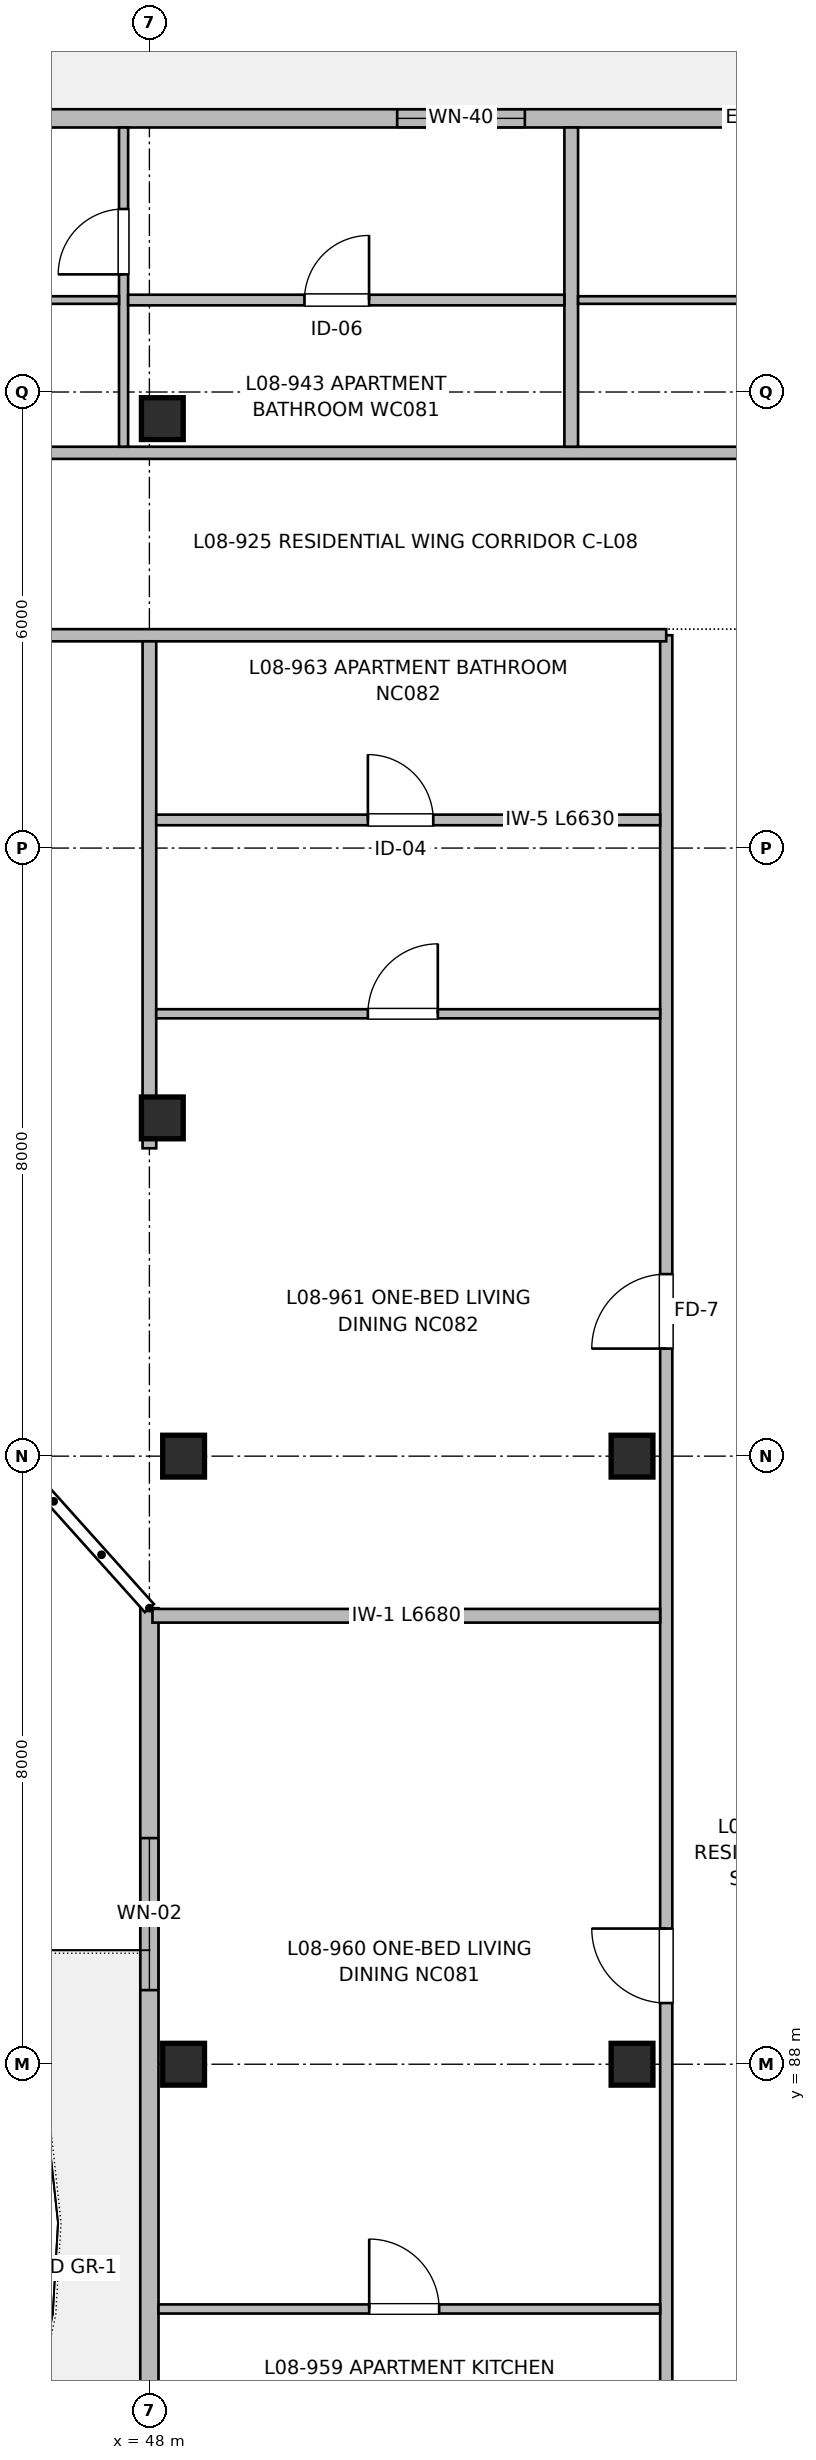
"""IFC4 building model, lengths in metres.
Left out: names, types, materials, properties, quantities, classifications, styles, units other than length and angle.
Written with IfcOpenShell. Run it as: python <this file> out.ifc"""

import sys

from ifc_helpers import new_model, si_unit, direction, frame, frame_2d, origin, origin_2d, place, context, subcontext, project, spatial, rectangle, extrude, element, fill, save


model = new_model("IFC4")
c1 = context("Model", 3, precision=1e-05, world=origin(), true_north=direction((0.0, 1.0)))
c2 = subcontext(c1, "Body", "Model", "MODEL_VIEW")
j1 = project(units=[si_unit("LENGTHUNIT", "METRE"), si_unit("PLANEANGLEUNIT", "RADIAN")], contexts=[c1])
p1 = place(None, origin())
s1 = spatial("IfcSite", under=j1, at=p1, CompositionType="ELEMENT")
p2 = place(p1, origin())
s2 = spatial("IfcBuilding", under=s1, at=p2, CompositionType="ELEMENT")
p3 = place(p2, frame((0.0, 0.0, 26.56)))
s3 = spatial("IfcBuildingStorey", under=s2, at=p3, CompositionType="ELEMENT", Elevation=26.56)
for number, where, z_axis, x_axis in (
    (1, (48.17, 100.45, 0.0), (0.0, 0.0, 1.0), (1.0, 0.0, 0.0)),
    (2, (48.17, 109.65, 0.0), (0.0, 0.0, 1.0), (1.0, 0.0, 0.0)),
    (3, (48.45, 88.0, 0.0), (0.0, 0.0, 1.0), (1.0, 0.0, 0.0)),
    (4, (48.45, 96.0, 0.0), (0.0, 0.0, 1.0), (1.0, 0.0, 0.0)),
    (5, (54.35, 88.0, 0.0), (0.0, 0.0, 1.0), (1.0, 0.0, 0.0)),
    (6, (54.35, 96.0, 0.0), (0.0, 0.0, 1.0), (1.0, 0.0, 0.0)),
):
    element("IfcColumn", number, at=place(p3, frame(where, z_axis=z_axis, x_axis=x_axis)), inside=s3, PredefinedType="COLUMN", context=c2, shape_type="SweptSolid", body=[
        extrude(rectangle(XDim=0.55, YDim=0.55, at=origin_2d()), origin(), (0.0, 0.0, 1.0), 3.2),
    ])
p4 = place(p3, frame((39.5, 113.6, 0.0), z_axis=(0.0, 0.0, 1.0), x_axis=(1.0, 0.0, 0.0)))
e7 = element("IfcWall", 7, at=p4, inside=s3, PredefinedType="SOLIDWALL", context=c2, shape_type="SweptSolid", body=[
    extrude(rectangle(XDim=42.0, YDim=0.24, at=frame_2d((21.0, 0.0))), origin(), (0.0, 0.0, 1.0), 2.98),
])
p5 = place(p4, frame((3.6, 0.0, 0.0)))
e8 = element("IfcOpeningElement", 8, at=p5, cuts=e7, PredefinedType="OPENING", context=c2, shape_type="SweptSolid", body=[
    extrude(rectangle(XDim=1.2, YDim=2.2, at=frame_2d((0.6, 1.1))), frame((0.0, 0.13, 0.0), z_axis=(0.0, -1.0, 0.0), x_axis=(1.0, 0.0, 0.0)), (0.0, 0.0, 1.0), 0.26),
])
p6 = place(p4, frame((5.5, 0.0, 0.87)))
e9 = element("IfcOpeningElement", 9, at=p6, cuts=e7, PredefinedType="OPENING", context=c2, shape_type="SweptSolid", body=[
    extrude(rectangle(XDim=1.25, YDim=1.35, at=frame_2d((0.625, 0.675))), frame((0.0, 0.13, 0.0), z_axis=(0.0, -1.0, 0.0), x_axis=(1.0, 0.0, 0.0)), (0.0, 0.0, 1.0), 0.26),
])
p7 = place(p4, frame((11.76, 0.0, 0.72)))
e10 = element("IfcOpeningElement", 10, at=p7, cuts=e7, PredefinedType="OPENING", context=c2, shape_type="SweptSolid", body=[
    extrude(rectangle(XDim=1.68, YDim=1.5, at=frame_2d((0.84, 0.75))), frame((0.0, 0.13, 0.0), z_axis=(0.0, -1.0, 0.0), x_axis=(1.0, 0.0, 0.0)), (0.0, 0.0, 1.0), 0.26),
])
p8 = place(p4, frame((20.4, 0.0, 0.0)))
e11 = element("IfcOpeningElement", 11, at=p8, cuts=e7, PredefinedType="OPENING", context=c2, shape_type="SweptSolid", body=[
    extrude(rectangle(XDim=1.2, YDim=2.2, at=frame_2d((0.6, 1.1))), frame((0.0, 0.13, 0.0), z_axis=(0.0, -1.0, 0.0), x_axis=(1.0, 0.0, 0.0)), (0.0, 0.0, 1.0), 0.26),
])
p9 = place(p4, frame((22.3, 0.0, 0.67)))
e12 = element("IfcOpeningElement", 12, at=p9, cuts=e7, PredefinedType="OPENING", context=c2, shape_type="SweptSolid", body=[
    extrude(rectangle(XDim=2.1, YDim=1.55, at=frame_2d((1.05, 0.775))), frame((0.0, 0.13, 0.0), z_axis=(0.0, -1.0, 0.0), x_axis=(1.0, 0.0, 0.0)), (0.0, 0.0, 1.0), 0.26),
])
p10 = place(p4, frame((28.4, 0.0, 0.72)))
e13 = element("IfcOpeningElement", 13, at=p10, cuts=e7, PredefinedType="OPENING", context=c2, shape_type="SweptSolid", body=[
    extrude(rectangle(XDim=2.0, YDim=1.5, at=frame_2d((1.0, 0.75))), frame((0.0, 0.13, 0.0), z_axis=(0.0, -1.0, 0.0), x_axis=(1.0, 0.0, 0.0)), (0.0, 0.0, 1.0), 0.26),
])
p11 = place(p4, frame((37.2, 0.0, 0.0)))
e14 = element("IfcOpeningElement", 14, at=p11, cuts=e7, PredefinedType="OPENING", context=c2, shape_type="SweptSolid", body=[
    extrude(rectangle(XDim=1.2, YDim=2.2, at=frame_2d((0.6, 1.1))), frame((0.0, 0.13, 0.0), z_axis=(0.0, -1.0, 0.0), x_axis=(1.0, 0.0, 0.0)), (0.0, 0.0, 1.0), 0.26),
])
p12 = place(p4, frame((39.1, 0.0, 0.9)))
e15 = element("IfcOpeningElement", 15, at=p12, cuts=e7, PredefinedType="OPENING", context=c2, shape_type="SweptSolid", body=[
    extrude(rectangle(XDim=1.05, YDim=1.15, at=frame_2d((0.525, 0.575))), frame((0.0, 0.13, 0.0), z_axis=(0.0, -1.0, 0.0), x_axis=(1.0, 0.0, 0.0)), (0.0, 0.0, 1.0), 0.26),
])
p13 = place(p3, frame((48.0, 61.8, 0.0), z_axis=(0.0, 0.0, 1.0), x_axis=(0.0, 1.0, 0.0)))
e16 = element("IfcWall", 16, at=p13, inside=s3, PredefinedType="SOLIDWALL", context=c2, shape_type="SweptSolid", body=[
    extrude(rectangle(XDim=32.2, YDim=0.24, at=frame_2d((16.1, 0.0))), origin(), (0.0, 0.0, 1.0), 2.98),
])
p14 = place(p13, frame((2.975, 0.0, 0.0)))
e17 = element("IfcOpeningElement", 17, at=p14, cuts=e16, PredefinedType="OPENING", context=c2, shape_type="SweptSolid", body=[
    extrude(rectangle(XDim=1.2, YDim=2.2, at=frame_2d((0.6, 1.1))), frame((0.0, 0.13, 0.0), z_axis=(0.0, -1.0, 0.0), x_axis=(1.0, 0.0, 0.0)), (0.0, 0.0, 1.0), 0.26),
])
p15 = place(p13, frame((5.775, 0.0, 0.87)))
e18 = element("IfcOpeningElement", 18, at=p15, cuts=e16, PredefinedType="OPENING", context=c2, shape_type="SweptSolid", body=[
    extrude(rectangle(XDim=1.25, YDim=1.35, at=frame_2d((0.625, 0.675))), frame((0.0, 0.13, 0.0), z_axis=(0.0, -1.0, 0.0), x_axis=(1.0, 0.0, 0.0)), (0.0, 0.0, 1.0), 0.26),
])
p16 = place(p13, frame((10.385, 0.0, 0.72)))
e19 = element("IfcOpeningElement", 19, at=p16, cuts=e16, PredefinedType="OPENING", context=c2, shape_type="SweptSolid", body=[
    extrude(rectangle(XDim=1.68, YDim=1.5, at=frame_2d((0.84, 0.75))), frame((0.0, 0.13, 0.0), z_axis=(0.0, -1.0, 0.0), x_axis=(1.0, 0.0, 0.0)), (0.0, 0.0, 1.0), 0.26),
])
p17 = place(p13, frame((18.375, 0.0, 0.72)))
e20 = element("IfcOpeningElement", 20, at=p17, cuts=e16, PredefinedType="OPENING", context=c2, shape_type="SweptSolid", body=[
    extrude(rectangle(XDim=1.8, YDim=1.5, at=frame_2d((0.9, 0.75))), frame((0.0, 0.13, 0.0), z_axis=(0.0, -1.0, 0.0), x_axis=(1.0, 0.0, 0.0)), (0.0, 0.0, 1.0), 0.26),
])
p18 = place(p13, frame((27.175, 0.0, 0.72)))
e21 = element("IfcOpeningElement", 21, at=p18, cuts=e16, PredefinedType="OPENING", context=c2, shape_type="SweptSolid", body=[
    extrude(rectangle(XDim=2.0, YDim=1.5, at=frame_2d((1.0, 0.75))), frame((0.0, 0.13, 0.0), z_axis=(0.0, -1.0, 0.0), x_axis=(1.0, 0.0, 0.0)), (0.0, 0.0, 1.0), 0.26),
])
p19 = place(p3, frame((54.8, 61.96, 0.0), z_axis=(0.0, 0.0, 1.0), x_axis=(0.0, 1.0, 0.0)))
e22 = element("IfcWall", 22, at=p19, inside=s3, PredefinedType="PARTITIONING", context=c2, shape_type="SweptSolid", body=[
    extrude(rectangle(XDim=44.84, YDim=0.16, at=frame_2d((22.42, 0.0))), origin(), (0.0, 0.0, 1.0), 2.935),
])
p20 = place(p19, frame((7.04, 0.0, 0.0)))
e23 = element("IfcOpeningElement", 23, at=p20, cuts=e22, PredefinedType="OPENING", context=c2, shape_type="SweptSolid", body=[
    extrude(rectangle(XDim=1.1, YDim=2.15, at=frame_2d((0.55, 1.075))), frame((0.0, 0.09, 0.0), z_axis=(0.0, -1.0, 0.0), x_axis=(1.0, 0.0, 0.0)), (0.0, 0.0, 1.0), 0.18),
])
p21 = place(p19, frame((13.44, 0.0, 0.0)))
e24 = element("IfcOpeningElement", 24, at=p21, cuts=e22, PredefinedType="OPENING", context=c2, shape_type="SweptSolid", body=[
    extrude(rectangle(XDim=1.6, YDim=2.15, at=frame_2d((0.8, 1.075))), frame((0.0, 0.09, 0.0), z_axis=(0.0, -1.0, 0.0), x_axis=(1.0, 0.0, 0.0)), (0.0, 0.0, 1.0), 0.18),
])
p22 = place(p19, frame((3.0, 0.0, 0.0)))
e25 = element("IfcOpeningElement", 25, at=p22, cuts=e22, PredefinedType="OPENING", context=c2, shape_type="SweptSolid", body=[
    extrude(rectangle(XDim=0.96, YDim=2.15, at=frame_2d((0.48, 1.075))), frame((0.0, 0.09, 0.0), z_axis=(0.0, -1.0, 0.0), x_axis=(1.0, 0.0, 0.0)), (0.0, 0.0, 1.0), 0.18),
])
p23 = place(p19, frame((26.845, 0.0, 0.0)))
e26 = element("IfcOpeningElement", 26, at=p23, cuts=e22, PredefinedType="OPENING", context=c2, shape_type="SweptSolid", body=[
    extrude(rectangle(XDim=0.98, YDim=2.15, at=frame_2d((0.49, 1.075))), frame((0.0, 0.09, 0.0), z_axis=(0.0, -1.0, 0.0), x_axis=(1.0, 0.0, 0.0)), (0.0, 0.0, 1.0), 0.18),
])
p24 = place(p19, frame((35.455, 0.0, 0.0)))
e27 = element("IfcOpeningElement", 27, at=p24, cuts=e22, PredefinedType="OPENING", context=c2, shape_type="SweptSolid", body=[
    extrude(rectangle(XDim=0.98, YDim=2.15, at=frame_2d((0.49, 1.075))), frame((0.0, 0.09, 0.0), z_axis=(0.0, -1.0, 0.0), x_axis=(1.0, 0.0, 0.0)), (0.0, 0.0, 1.0), 0.18),
])
p25 = place(p3, frame((39.66, 106.8, 0.0), z_axis=(0.0, 0.0, 1.0), x_axis=(1.0, 0.0, 0.0)))
e28 = element("IfcWall", 28, at=p25, inside=s3, PredefinedType="PARTITIONING", context=c2, shape_type="SweptSolid", body=[
    extrude(rectangle(XDim=15.14, YDim=0.16, at=frame_2d((7.57, 0.0))), origin(), (0.0, 0.0, 1.0), 2.935),
])
p26 = place(p3, frame((39.66, 109.2, 0.0), z_axis=(0.0, 0.0, 1.0), x_axis=(1.0, 0.0, 0.0)))
e29 = element("IfcWall", 29, at=p26, inside=s3, PredefinedType="PARTITIONING", context=c2, shape_type="SweptSolid", body=[
    extrude(rectangle(XDim=41.68, YDim=0.16, at=frame_2d((20.84, 0.0))), origin(), (0.0, 0.0, 1.0), 2.935),
])
p27 = place(p26, frame((3.51, 0.0, 0.0)))
e30 = element("IfcOpeningElement", 30, at=p27, cuts=e29, PredefinedType="OPENING", context=c2, shape_type="SweptSolid", body=[
    extrude(rectangle(XDim=0.98, YDim=2.15, at=frame_2d((0.49, 1.075))), frame((0.0, 0.09, 0.0), z_axis=(0.0, -1.0, 0.0), x_axis=(1.0, 0.0, 0.0)), (0.0, 0.0, 1.0), 0.18),
])
p28 = place(p26, frame((17.47, 0.0, 0.0)))
e31 = element("IfcOpeningElement", 31, at=p28, cuts=e29, PredefinedType="OPENING", context=c2, shape_type="SweptSolid", body=[
    extrude(rectangle(XDim=0.98, YDim=2.15, at=frame_2d((0.49, 1.075))), frame((0.0, 0.09, 0.0), z_axis=(0.0, -1.0, 0.0), x_axis=(1.0, 0.0, 0.0)), (0.0, 0.0, 1.0), 0.18),
])
p29 = place(p26, frame((31.39, 0.0, 0.0)))
e32 = element("IfcOpeningElement", 32, at=p29, cuts=e29, PredefinedType="OPENING", context=c2, shape_type="SweptSolid", body=[
    extrude(rectangle(XDim=0.98, YDim=2.15, at=frame_2d((0.49, 1.075))), frame((0.0, 0.09, 0.0), z_axis=(0.0, -1.0, 0.0), x_axis=(1.0, 0.0, 0.0)), (0.0, 0.0, 1.0), 0.18),
])
p30 = place(p3, frame((48.0, 100.05, 0.0), z_axis=(0.0, 0.0, 1.0), x_axis=(0.0, 1.0, 0.0)))
e33 = element("IfcWall", 33, at=p30, inside=s3, PredefinedType="PARTITIONING", context=c2, shape_type="SweptSolid", body=[
    extrude(rectangle(XDim=6.67, YDim=0.18, at=frame_2d((3.335, 0.0))), origin(), (0.0, 0.0, 1.0), 2.68),
])
p31 = place(p3, frame((53.55, 109.28, 0.0), z_axis=(0.0, 0.0, 1.0), x_axis=(0.0, 1.0, 0.0)))
e34 = element("IfcWall", 34, at=p31, inside=s3, PredefinedType="PARTITIONING", context=c2, shape_type="SweptSolid", body=[
    extrude(rectangle(XDim=4.2, YDim=0.18, at=frame_2d((2.1, 0.0))), origin(), (0.0, 0.0, 1.0), 2.935),
])
p32 = place(p3, frame((47.66, 109.28, 0.0), z_axis=(0.0, 0.0, 1.0), x_axis=(0.0, 1.0, 0.0)))
e35 = element("IfcWall", 35, at=p32, inside=s3, PredefinedType="PARTITIONING", context=c2, shape_type="SweptSolid", body=[
    extrude(rectangle(XDim=4.2, YDim=0.12, at=frame_2d((2.1, 0.0))), origin(), (0.0, 0.0, 1.0), 2.935),
])
p33 = place(p32, frame((2.268, 0.0, 0.0)))
e36 = element("IfcOpeningElement", 36, at=p33, cuts=e35, PredefinedType="OPENING", context=c2, shape_type="SweptSolid", body=[
    extrude(rectangle(XDim=0.86, YDim=2.1, at=frame_2d((0.43, 1.05))), frame((0.0, 0.07, 0.0), z_axis=(0.0, -1.0, 0.0), x_axis=(1.0, 0.0, 0.0)), (0.0, 0.0, 1.0), 0.14),
])
p34 = place(p3, frame((47.72, 111.21, 0.0), z_axis=(0.0, 0.0, 1.0), x_axis=(1.0, 0.0, 0.0)))
e37 = element("IfcWall", 37, at=p34, inside=s3, PredefinedType="PARTITIONING", context=c2, shape_type="SweptSolid", body=[
    extrude(rectangle(XDim=5.74, YDim=0.14, at=frame_2d((2.87, 0.0))), origin(), (0.0, 0.0, 1.0), 2.935),
])
p35 = place(p34, frame((2.32, 0.0, 0.0)))
e38 = element("IfcOpeningElement", 38, at=p35, cuts=e37, PredefinedType="OPENING", context=c2, shape_type="SweptSolid", body=[
    extrude(rectangle(XDim=0.85, YDim=2.05, at=frame_2d((0.425, 1.025))), frame((0.0, 0.08, 0.0), z_axis=(0.0, -1.0, 0.0), x_axis=(1.0, 0.0, 0.0)), (0.0, 0.0, 1.0), 0.16),
])
p36 = place(p3, frame((39.66, 111.21, 0.0), z_axis=(0.0, 0.0, 1.0), x_axis=(1.0, 0.0, 0.0)))
e39 = element("IfcWall", 39, at=p36, inside=s3, PredefinedType="PARTITIONING", context=c2, shape_type="SweptSolid", body=[
    extrude(rectangle(XDim=7.94, YDim=0.1, at=frame_2d((3.97, 0.0))), origin(), (0.0, 0.0, 1.0), 2.935),
])
p37 = place(p36, frame((3.2, 0.0, 0.0)))
e40 = element("IfcOpeningElement", 40, at=p37, cuts=e39, PredefinedType="OPENING", context=c2, shape_type="SweptSolid", body=[
    extrude(rectangle(XDim=0.92, YDim=2.1, at=frame_2d((0.46, 1.05))), frame((0.0, 0.06, 0.0), z_axis=(0.0, -1.0, 0.0), x_axis=(1.0, 0.0, 0.0)), (0.0, 0.0, 1.0), 0.12),
])
p38 = place(p3, frame((53.64, 111.21, 0.0), z_axis=(0.0, 0.0, 1.0), x_axis=(1.0, 0.0, 0.0)))
e41 = element("IfcWall", 41, at=p38, inside=s3, PredefinedType="PARTITIONING", context=c2, shape_type="SweptSolid", body=[
    extrude(rectangle(XDim=7.9, YDim=0.1, at=frame_2d((3.95, 0.0))), origin(), (0.0, 0.0, 1.0), 2.935),
])
p39 = place(p38, frame((3.584, 0.0, 0.0)))
e42 = element("IfcOpeningElement", 42, at=p39, cuts=e41, PredefinedType="OPENING", context=c2, shape_type="SweptSolid", body=[
    extrude(rectangle(XDim=0.92, YDim=2.1, at=frame_2d((0.46, 1.05))), frame((0.0, 0.06, 0.0), z_axis=(0.0, -1.0, 0.0), x_axis=(1.0, 0.0, 0.0)), (0.0, 0.0, 1.0), 0.12),
])
p40 = place(p3, frame((48.04, 93.9, 0.0), z_axis=(0.0, 0.0, 1.0), x_axis=(1.0, 0.0, 0.0)))
e43 = element("IfcWall", 43, at=p40, inside=s3, PredefinedType="PARTITIONING", context=c2, shape_type="SweptSolid", body=[
    extrude(rectangle(XDim=6.68, YDim=0.18, at=frame_2d((3.34, 0.0))), origin(), (0.0, 0.0, 1.0), 2.935),
])
p41 = place(p3, frame((48.12, 84.78, 0.0), z_axis=(0.0, 0.0, 1.0), x_axis=(1.0, 0.0, 0.0)))
e44 = element("IfcWall", 44, at=p41, inside=s3, PredefinedType="PARTITIONING", context=c2, shape_type="SweptSolid", body=[
    extrude(rectangle(XDim=6.6, YDim=0.12, at=frame_2d((3.3, 0.0))), origin(), (0.0, 0.0, 1.0), 2.935),
])
p42 = place(p41, frame((2.772, 0.0, 0.0)))
e45 = element("IfcOpeningElement", 45, at=p42, cuts=e44, PredefinedType="OPENING", context=c2, shape_type="SweptSolid", body=[
    extrude(rectangle(XDim=0.92, YDim=2.1, at=frame_2d((0.46, 1.05))), frame((0.0, 0.07, 0.0), z_axis=(0.0, -1.0, 0.0), x_axis=(1.0, 0.0, 0.0)), (0.0, 0.0, 1.0), 0.14),
])
p43 = place(p3, frame((48.09, 101.82, 0.0), z_axis=(0.0, 0.0, 1.0), x_axis=(1.0, 0.0, 0.0)))
e46 = element("IfcWall", 46, at=p43, inside=s3, PredefinedType="PARTITIONING", context=c2, shape_type="SweptSolid", body=[
    extrude(rectangle(XDim=6.63, YDim=0.12, at=frame_2d((3.315, 0.0))), origin(), (0.0, 0.0, 1.0), 2.935),
])
p44 = place(p43, frame((2.785, 0.0, 0.0)))
e47 = element("IfcOpeningElement", 47, at=p44, cuts=e46, PredefinedType="OPENING", context=c2, shape_type="SweptSolid", body=[
    extrude(rectangle(XDim=0.92, YDim=2.1, at=frame_2d((0.46, 1.05))), frame((0.0, 0.07, 0.0), z_axis=(0.0, -1.0, 0.0), x_axis=(1.0, 0.0, 0.0)), (0.0, 0.0, 1.0), 0.14),
])
p45 = place(p3, frame((48.09, 104.37, 0.0), z_axis=(0.0, 0.0, 1.0), x_axis=(1.0, 0.0, 0.0)))
e48 = element("IfcWall", 48, at=p45, inside=s3, PredefinedType="PARTITIONING", context=c2, shape_type="SweptSolid", body=[
    extrude(rectangle(XDim=6.63, YDim=0.14, at=frame_2d((3.315, 0.0))), origin(), (0.0, 0.0, 1.0), 2.935),
])
p46 = place(p45, frame((2.785, 0.0, 0.0)))
e49 = element("IfcOpeningElement", 49, at=p46, cuts=e48, PredefinedType="OPENING", context=c2, shape_type="SweptSolid", body=[
    extrude(rectangle(XDim=0.86, YDim=2.1, at=frame_2d((0.43, 1.05))), frame((0.0, 0.08, 0.0), z_axis=(0.0, -1.0, 0.0), x_axis=(1.0, 0.0, 0.0)), (0.0, 0.0, 1.0), 0.16),
])
p47 = place(p7, origin())
e50 = element("IfcWindow", 50, at=p47, inside=s3, PartitioningType="SINGLE_PANEL", PredefinedType="WINDOW", context=c2, shape_type="SweptSolid", body=[
    extrude(rectangle(XDim=1.68, YDim=1.5, at=frame_2d((0.84, 0.75))), frame((0.0, 0.03, 0.0), z_axis=(0.0, -1.0, 0.0), x_axis=(1.0, 0.0, 0.0)), (0.0, 0.0, 1.0), 0.06),
])
fill(e10, e50)
p48 = place(p18, origin())
e51 = element("IfcWindow", 51, at=p48, inside=s3, PartitioningType="SINGLE_PANEL", PredefinedType="WINDOW", context=c2, shape_type="SweptSolid", body=[
    extrude(rectangle(XDim=2.0, YDim=1.5, at=frame_2d((1.0, 0.75))), frame((0.0, 0.03, 0.0), z_axis=(0.0, -1.0, 0.0), x_axis=(1.0, 0.0, 0.0)), (0.0, 0.0, 1.0), 0.06),
])
fill(e21, e51)
p49 = place(p33, origin())
e52 = element("IfcDoor", 52, at=p49, inside=s3, OperationType="SINGLE_SWING_LEFT", PredefinedType="DOOR", context=c2, shape_type="SweptSolid", body=[
    extrude(rectangle(XDim=0.86, YDim=2.1, at=frame_2d((0.43, 1.05))), frame((0.0, 0.025, 0.0), z_axis=(0.0, -1.0, 0.0), x_axis=(1.0, 0.0, 0.0)), (0.0, 0.0, 1.0), 0.05),
])
fill(e36, e52)
p50 = place(p35, origin())
e53 = element("IfcDoor", 53, at=p50, inside=s3, OperationType="SINGLE_SWING_RIGHT", PredefinedType="DOOR", context=c2, shape_type="SweptSolid", body=[
    extrude(rectangle(XDim=0.85, YDim=2.05, at=frame_2d((0.425, 1.025))), frame((0.0, 0.025, 0.0), z_axis=(0.0, -1.0, 0.0), x_axis=(1.0, 0.0, 0.0)), (0.0, 0.0, 1.0), 0.05),
])
fill(e38, e53)
p51 = place(p42, origin())
e54 = element("IfcDoor", 54, at=p51, inside=s3, OperationType="SINGLE_SWING_LEFT", PredefinedType="DOOR", context=c2, shape_type="SweptSolid", body=[
    extrude(rectangle(XDim=0.92, YDim=2.1, at=frame_2d((0.46, 1.05))), frame((0.0, 0.025, 0.0), z_axis=(0.0, -1.0, 0.0), x_axis=(1.0, 0.0, 0.0)), (0.0, 0.0, 1.0), 0.05),
])
fill(e45, e54)
p52 = place(p23, origin())
e55 = element("IfcDoor", 55, at=p52, inside=s3, OperationType="SINGLE_SWING_RIGHT", PredefinedType="DOOR", context=c2, shape_type="SweptSolid", body=[
    extrude(rectangle(XDim=0.98, YDim=2.15, at=frame_2d((0.49, 1.075))), frame((0.0, 0.025, 0.0), z_axis=(0.0, -1.0, 0.0), x_axis=(1.0, 0.0, 0.0)), (0.0, 0.0, 1.0), 0.05),
])
fill(e26, e55)
p53 = place(p46, origin())
e56 = element("IfcDoor", 56, at=p53, inside=s3, OperationType="SINGLE_SWING_LEFT", PredefinedType="DOOR", context=c2, shape_type="SweptSolid", body=[
    extrude(rectangle(XDim=0.86, YDim=2.1, at=frame_2d((0.43, 1.05))), frame((0.0, 0.025, 0.0), z_axis=(0.0, -1.0, 0.0), x_axis=(1.0, 0.0, 0.0)), (0.0, 0.0, 1.0), 0.05),
])
fill(e49, e56)
p54 = place(p44, origin())
e57 = element("IfcDoor", 57, at=p54, inside=s3, OperationType="SINGLE_SWING_RIGHT", PredefinedType="DOOR", context=c2, shape_type="SweptSolid", body=[
    extrude(rectangle(XDim=0.92, YDim=2.1, at=frame_2d((0.46, 1.05))), frame((0.0, 0.025, 0.0), z_axis=(0.0, -1.0, 0.0), x_axis=(1.0, 0.0, 0.0)), (0.0, 0.0, 1.0), 0.05),
])
fill(e47, e57)
p55 = place(p24, origin())
e58 = element("IfcDoor", 58, at=p55, inside=s3, OperationType="SINGLE_SWING_LEFT", PredefinedType="DOOR", context=c2, shape_type="SweptSolid", body=[
    extrude(rectangle(XDim=0.98, YDim=2.15, at=frame_2d((0.49, 1.075))), frame((0.0, 0.025, 0.0), z_axis=(0.0, -1.0, 0.0), x_axis=(1.0, 0.0, 0.0)), (0.0, 0.0, 1.0), 0.05),
])
fill(e27, e58)
save(model, sys.argv[1])
